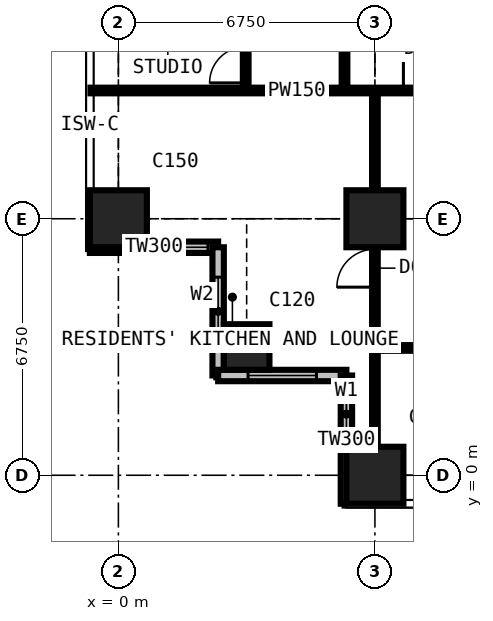
"""IFC4 building model, lengths in metres.
Left out: names, types, materials, properties, quantities, classifications, styles, units other than length and angle.
Written with IfcOpenShell. Run it as: python <this file> out.ifc"""

import sys

from ifc_helpers import new_model, si_unit, direction, frame, frame_2d, origin, origin_2d, place, context, subcontext, project, spatial, rectangle, extrude, element, fill, save


model = new_model("IFC4")
c1 = context("Model", 3, precision=1e-05, world=origin(), true_north=direction((0.0, 1.0)))
c2 = subcontext(c1, "Body", "Model", "MODEL_VIEW")
j1 = project(units=[si_unit("LENGTHUNIT", "METRE"), si_unit("PLANEANGLEUNIT", "RADIAN")], contexts=[c1])
p1 = place(None, origin())
s1 = spatial("IfcSite", under=j1, at=p1, CompositionType="ELEMENT")
p2 = place(p1, origin())
s2 = spatial("IfcBuilding", under=s1, at=p2, CompositionType="ELEMENT")
p3 = place(p2, frame((0.0, 0.0, 142.2)))
s3 = spatial("IfcBuildingStorey", under=s2, at=p3, CompositionType="ELEMENT", Elevation=142.2)
p4 = place(p3, frame((0.0, 6.75, 0.0), z_axis=(0.0, 0.0, 1.0), x_axis=(1.0, 0.0, 0.0)))
e1 = element("IfcColumn", 1, at=p4, inside=s3, PredefinedType="COLUMN", context=c2, shape_type="SweptSolid", body=[
    extrude(rectangle(XDim=1.5, YDim=1.5, at=origin_2d()), origin(), (0.0, 0.0, 1.0), 3.6),
])
p5 = place(p3, frame((3.375, 3.375, 0.0), z_axis=(0.0, 0.0, 1.0), x_axis=(1.0, 0.0, 0.0)))
e2 = element("IfcColumn", 2, at=p5, inside=s3, PredefinedType="COLUMN", context=c2, shape_type="SweptSolid", body=[
    extrude(rectangle(XDim=1.2, YDim=1.2, at=origin_2d()), origin(), (0.0, 0.0, 1.0), 3.6),
])
for number, where, z_axis, x_axis in (
    (3, (6.75, 0.0, 0.0), (0.0, 0.0, 1.0), (1.0, 0.0, 0.0)),
    (4, (6.75, 6.75, 0.0), (0.0, 0.0, 1.0), (1.0, 0.0, 0.0)),
):
    element("IfcColumn", number, at=place(p3, frame(where, z_axis=z_axis, x_axis=x_axis)), inside=s3, PredefinedType="COLUMN", context=c2, shape_type="SweptSolid", body=[
        extrude(rectangle(XDim=1.5, YDim=1.5, at=origin_2d()), origin(), (0.0, 0.0, 1.0), 3.6),
    ])
p6 = place(p3, frame((-0.75, 6.0, 0.0), z_axis=(0.0, 0.0, 1.0), x_axis=(1.0, 0.0, 0.0)))
e5 = element("IfcWall", 5, at=p6, inside=s3, PredefinedType="SOLIDWALL", context=c2, shape_type="SweptSolid", body=[
    extrude(rectangle(XDim=3.375, YDim=0.3, at=frame_2d((1.688, 0.0))), origin(), (0.0, 0.0, 1.0), 3.375),
])
p7 = place(p6, frame((1.607, 0.0, 0.9)))
e6 = element("IfcOpeningElement", 6, at=p7, cuts=e5, PredefinedType="OPENING", context=c2, shape_type="SweptSolid", body=[
    extrude(rectangle(XDim=1.5, YDim=1.8, at=frame_2d((0.75, 0.9))), frame((0.0, 0.16, 0.0), z_axis=(0.0, -1.0, 0.0), x_axis=(1.0, 0.0, 0.0)), (0.0, 0.0, 1.0), 0.32),
])
p8 = place(p3, frame((2.625, 6.0, 0.0), z_axis=(0.0, 0.0, 1.0), x_axis=(0.0, -1.0, 0.0)))
e7 = element("IfcWall", 7, at=p8, inside=s3, PredefinedType="SOLIDWALL", context=c2, shape_type="SweptSolid", body=[
    extrude(rectangle(XDim=3.375, YDim=0.3, at=frame_2d((1.688, 0.0))), origin(), (0.0, 0.0, 1.0), 3.375),
])
p9 = place(p8, frame((0.788, 0.0, 0.6)))
e8 = element("IfcOpeningElement", 8, at=p9, cuts=e7, PredefinedType="OPENING", context=c2, shape_type="SweptSolid", body=[
    extrude(rectangle(XDim=1.8, YDim=2.1, at=frame_2d((0.9, 1.05))), frame((0.0, 0.16, 0.0), z_axis=(0.0, -1.0, 0.0), x_axis=(1.0, 0.0, 0.0)), (0.0, 0.0, 1.0), 0.32),
])
p10 = place(p3, frame((2.625, 2.625, 0.0), z_axis=(0.0, 0.0, 1.0), x_axis=(1.0, 0.0, 0.0)))
e9 = element("IfcWall", 9, at=p10, inside=s3, PredefinedType="SOLIDWALL", context=c2, shape_type="SweptSolid", body=[
    extrude(rectangle(XDim=3.375, YDim=0.3, at=frame_2d((1.688, 0.0))), origin(), (0.0, 0.0, 1.0), 3.375),
])
p11 = place(p10, frame((0.788, 0.0, 0.6)))
e10 = element("IfcOpeningElement", 10, at=p11, cuts=e9, PredefinedType="OPENING", context=c2, shape_type="SweptSolid", body=[
    extrude(rectangle(XDim=1.8, YDim=2.1, at=frame_2d((0.9, 1.05))), frame((0.0, 0.16, 0.0), z_axis=(0.0, -1.0, 0.0), x_axis=(1.0, 0.0, 0.0)), (0.0, 0.0, 1.0), 0.32),
])
p12 = place(p3, frame((6.0, 2.625, 0.0), z_axis=(0.0, 0.0, 1.0), x_axis=(0.0, -1.0, 0.0)))
e11 = element("IfcWall", 11, at=p12, inside=s3, PredefinedType="SOLIDWALL", context=c2, shape_type="SweptSolid", body=[
    extrude(rectangle(XDim=3.375, YDim=0.3, at=frame_2d((1.688, 0.0))), origin(), (0.0, 0.0, 1.0), 3.375),
])
p13 = place(p12, frame((0.268, 0.0, 0.9)))
e12 = element("IfcOpeningElement", 12, at=p13, cuts=e11, PredefinedType="OPENING", context=c2, shape_type="SweptSolid", body=[
    extrude(rectangle(XDim=1.5, YDim=1.8, at=frame_2d((0.75, 0.9))), frame((0.0, 0.16, 0.0), z_axis=(0.0, -1.0, 0.0), x_axis=(1.0, 0.0, 0.0)), (0.0, 0.0, 1.0), 0.32),
])
p14 = place(p3, frame((-0.734, 10.125, 0.0), z_axis=(0.0, 0.0, 1.0), x_axis=(1.0, 0.0, 0.0)))
e13 = element("IfcWall", 13, at=p14, inside=s3, PredefinedType="PARTITIONING", context=c2, shape_type="SweptSolid", body=[
    extrude(rectangle(XDim=10.859, YDim=0.15, at=frame_2d((5.429, 0.0))), origin(), (0.0, 0.0, 1.0), 3.375),
])
p15 = place(p14, frame((8.234, 0.0, 0.0)))
e14 = element("IfcOpeningElement", 14, at=p15, cuts=e13, PredefinedType="OPENING", context=c2, shape_type="SweptSolid", body=[
    extrude(rectangle(XDim=0.95, YDim=2.2, at=frame_2d((0.475, 1.1))), frame((0.0, 0.085, 0.0), z_axis=(0.0, -1.0, 0.0), x_axis=(1.0, 0.0, 0.0)), (0.0, 0.0, 1.0), 0.17),
])
p16 = place(p3, frame((3.35, 10.125, 0.0), z_axis=(0.0, 0.0, 1.0), x_axis=(0.0, 1.0, 0.0)))
e15 = element("IfcWall", 15, at=p16, inside=s3, PredefinedType="PARTITIONING", context=c2, shape_type="SweptSolid", body=[
    extrude(rectangle(XDim=16.875, YDim=0.15, at=frame_2d((8.438, 0.0))), origin(), (0.0, 0.0, 1.0), 3.375),
])
p17 = place(p16, frame((7.575, 0.0, 0.0)))
e16 = element("IfcOpeningElement", 16, at=p17, cuts=e15, PredefinedType="OPENING", context=c2, shape_type="SweptSolid", body=[
    extrude(rectangle(XDim=0.95, YDim=2.2, at=frame_2d((0.475, 1.1))), frame((0.0, 0.085, 0.0), z_axis=(0.0, -1.0, 0.0), x_axis=(1.0, 0.0, 0.0)), (0.0, 0.0, 1.0), 0.17),
])
p18 = place(p16, frame((14.325, 0.0, 0.0)))
e17 = element("IfcOpeningElement", 17, at=p18, cuts=e15, PredefinedType="OPENING", context=c2, shape_type="SweptSolid", body=[
    extrude(rectangle(XDim=0.95, YDim=2.2, at=frame_2d((0.475, 1.1))), frame((0.0, 0.085, 0.0), z_axis=(0.0, -1.0, 0.0), x_axis=(1.0, 0.0, 0.0)), (0.0, 0.0, 1.0), 0.17),
])
p19 = place(p16, frame((0.2, 0.0, 0.0)))
e18 = element("IfcOpeningElement", 18, at=p19, cuts=e15, PredefinedType="OPENING", context=c2, shape_type="SweptSolid", body=[
    extrude(rectangle(XDim=0.95, YDim=2.2, at=frame_2d((0.475, 1.1))), frame((0.0, 0.085, 0.0), z_axis=(0.0, -1.0, 0.0), x_axis=(1.0, 0.0, 0.0)), (0.0, 0.0, 1.0), 0.17),
])
p20 = place(p3, frame((5.95, 10.125, 0.0), z_axis=(0.0, 0.0, 1.0), x_axis=(0.0, 1.0, 0.0)))
e19 = element("IfcWall", 19, at=p20, inside=s3, PredefinedType="PARTITIONING", context=c2, shape_type="SweptSolid", body=[
    extrude(rectangle(XDim=2.65, YDim=0.15, at=frame_2d((1.325, 0.0))), origin(), (0.0, 0.0, 1.0), 3.375),
])
p21 = place(p3, frame((6.75, -0.734, 0.0), z_axis=(0.0, 0.0, 1.0), x_axis=(0.0, 1.0, 0.0)))
e20 = element("IfcWall", 20, at=p21, inside=s3, PredefinedType="PARTITIONING", context=c2, shape_type="SweptSolid", body=[
    extrude(rectangle(XDim=10.859, YDim=0.15, at=frame_2d((5.429, 0.0))), origin(), (0.0, 0.0, 1.0), 2.877),
])
p22 = place(p21, frame((5.684, 0.0, 0.0)))
e21 = element("IfcOpeningElement", 21, at=p22, cuts=e20, PredefinedType="OPENING", context=c2, shape_type="SweptSolid", body=[
    extrude(rectangle(XDim=1.0, YDim=2.2, at=frame_2d((0.5, 1.1))), frame((0.0, 0.085, 0.0), z_axis=(0.0, -1.0, 0.0), x_axis=(1.0, 0.0, 0.0)), (0.0, 0.0, 1.0), 0.17),
])
p23 = place(p3, frame((6.75, 3.35, 0.0), z_axis=(0.0, 0.0, 1.0), x_axis=(1.0, 0.0, 0.0)))
e22 = element("IfcWall", 22, at=p23, inside=s3, PredefinedType="PARTITIONING", context=c2, shape_type="SweptSolid", body=[
    extrude(rectangle(XDim=20.25, YDim=0.15, at=frame_2d((10.125, 0.0))), origin(), (0.0, 0.0, 1.0), 3.375),
])
p24 = place(p23, frame((15.1, 0.0, 0.0)))
e23 = element("IfcOpeningElement", 23, at=p24, cuts=e22, PredefinedType="OPENING", context=c2, shape_type="SweptSolid", body=[
    extrude(rectangle(XDim=0.95, YDim=2.2, at=frame_2d((0.475, 1.1))), frame((0.0, 0.085, 0.0), z_axis=(0.0, -1.0, 0.0), x_axis=(1.0, 0.0, 0.0)), (0.0, 0.0, 1.0), 0.17),
])
p25 = place(p23, frame((8.35, 0.0, 0.0)))
e24 = element("IfcOpeningElement", 24, at=p25, cuts=e22, PredefinedType="OPENING", context=c2, shape_type="SweptSolid", body=[
    extrude(rectangle(XDim=0.95, YDim=2.2, at=frame_2d((0.475, 1.1))), frame((0.0, 0.085, 0.0), z_axis=(0.0, -1.0, 0.0), x_axis=(1.0, 0.0, 0.0)), (0.0, 0.0, 1.0), 0.17),
])
p26 = place(p23, frame((1.6, 0.0, 0.0)))
e25 = element("IfcOpeningElement", 25, at=p26, cuts=e22, PredefinedType="OPENING", context=c2, shape_type="SweptSolid", body=[
    extrude(rectangle(XDim=0.95, YDim=2.2, at=frame_2d((0.475, 1.1))), frame((0.0, 0.085, 0.0), z_axis=(0.0, -1.0, 0.0), x_axis=(1.0, 0.0, 0.0)), (0.0, 0.0, 1.0), 0.17),
])
p27 = place(p7, origin())
e26 = element("IfcWindow", 26, at=p27, inside=s3, PartitioningType="SINGLE_PANEL", PredefinedType="WINDOW", context=c2, shape_type="SweptSolid", body=[
    extrude(rectangle(XDim=1.5, YDim=1.8, at=frame_2d((0.75, 0.9))), frame((0.0, 0.03, 0.0), z_axis=(0.0, -1.0, 0.0), x_axis=(1.0, 0.0, 0.0)), (0.0, 0.0, 1.0), 0.06),
])
fill(e6, e26)
p28 = place(p9, origin())
e27 = element("IfcWindow", 27, at=p28, inside=s3, PartitioningType="SINGLE_PANEL", PredefinedType="WINDOW", context=c2, shape_type="SweptSolid", body=[
    extrude(rectangle(XDim=1.8, YDim=2.1, at=frame_2d((0.9, 1.05))), frame((0.0, 0.03, 0.0), z_axis=(0.0, -1.0, 0.0), x_axis=(1.0, 0.0, 0.0)), (0.0, 0.0, 1.0), 0.06),
])
fill(e8, e27)
p29 = place(p11, origin())
e28 = element("IfcWindow", 28, at=p29, inside=s3, PartitioningType="SINGLE_PANEL", PredefinedType="WINDOW", context=c2, shape_type="SweptSolid", body=[
    extrude(rectangle(XDim=1.8, YDim=2.1, at=frame_2d((0.9, 1.05))), frame((0.0, 0.03, 0.0), z_axis=(0.0, -1.0, 0.0), x_axis=(1.0, 0.0, 0.0)), (0.0, 0.0, 1.0), 0.06),
])
fill(e10, e28)
p30 = place(p13, origin())
e29 = element("IfcWindow", 29, at=p30, inside=s3, PartitioningType="SINGLE_PANEL", PredefinedType="WINDOW", context=c2, shape_type="SweptSolid", body=[
    extrude(rectangle(XDim=1.5, YDim=1.8, at=frame_2d((0.75, 0.9))), frame((0.0, 0.03, 0.0), z_axis=(0.0, -1.0, 0.0), x_axis=(1.0, 0.0, 0.0)), (0.0, 0.0, 1.0), 0.06),
])
fill(e12, e29)
p31 = place(p22, origin())
e30 = element("IfcDoor", 30, at=p31, inside=s3, OperationType="SINGLE_SWING_LEFT", PredefinedType="DOOR", context=c2, shape_type="SweptSolid", body=[
    extrude(rectangle(XDim=1.0, YDim=2.2, at=frame_2d((0.5, 1.1))), frame((0.0, 0.025, 0.0), z_axis=(0.0, -1.0, 0.0), x_axis=(1.0, 0.0, 0.0)), (0.0, 0.0, 1.0), 0.05),
])
fill(e21, e30)
p32 = place(p19, origin())
e31 = element("IfcDoor", 31, at=p32, inside=s3, OperationType="SINGLE_SWING_LEFT", PredefinedType="DOOR", context=c2, shape_type="SweptSolid", body=[
    extrude(rectangle(XDim=0.95, YDim=2.2, at=frame_2d((0.475, 1.1))), frame((0.0, 0.025, 0.0), z_axis=(0.0, -1.0, 0.0), x_axis=(1.0, 0.0, 0.0)), (0.0, 0.0, 1.0), 0.05),
])
fill(e18, e31)
p33 = place(p15, origin())
e32 = element("IfcDoor", 32, at=p33, inside=s3, OperationType="SINGLE_SWING_LEFT", PredefinedType="DOOR", context=c2, shape_type="SweptSolid", body=[
    extrude(rectangle(XDim=0.95, YDim=2.2, at=frame_2d((0.475, 1.1))), frame((0.0, 0.025, 0.0), z_axis=(0.0, -1.0, 0.0), x_axis=(1.0, 0.0, 0.0)), (0.0, 0.0, 1.0), 0.05),
])
fill(e14, e32)
save(model, sys.argv[1])
